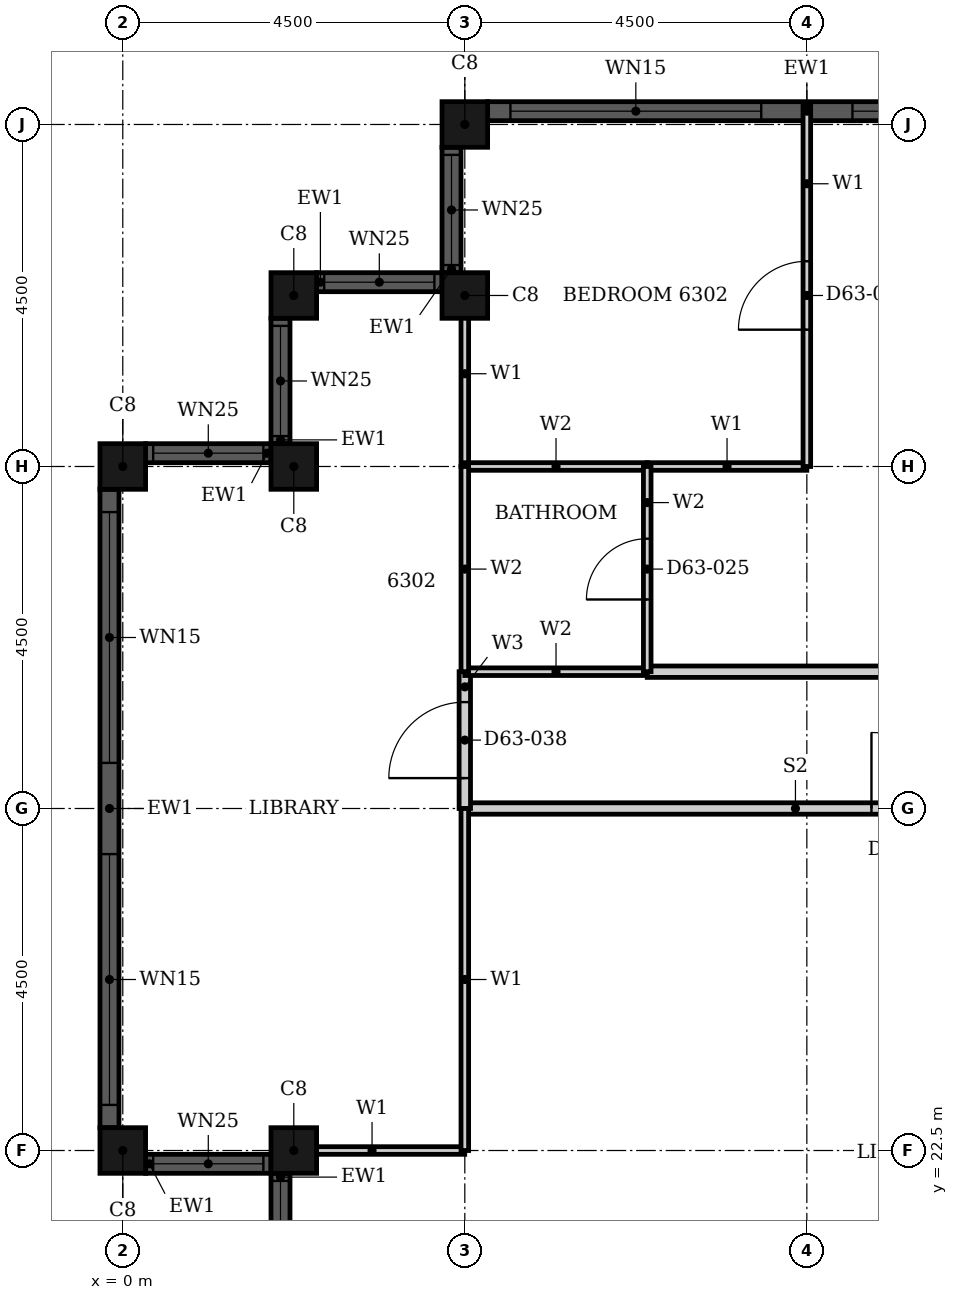
"""IFC4 building model, lengths in metres.
Left out: names, types, materials, properties, quantities, classifications, styles, units other than length and angle.
Written with IfcOpenShell. Run it as: python <this file> out.ifc"""

import sys

from ifc_helpers import new_model, si_unit, direction, frame, frame_2d, origin, origin_2d, place, context, subcontext, project, spatial, rectangle, hollow_rectangle, extrude, element, fill, save


model = new_model("IFC4")
c1 = context("Model", 3, precision=1e-05, world=origin(), true_north=direction((0.0, 1.0)))
c2 = subcontext(c1, "Body", "Model", "MODEL_VIEW")
j1 = project(units=[si_unit("LENGTHUNIT", "METRE"), si_unit("PLANEANGLEUNIT", "RADIAN")], contexts=[c1])
p1 = place(None, origin())
s1 = spatial("IfcSite", under=j1, at=p1, CompositionType="ELEMENT")
p2 = place(p1, origin())
s2 = spatial("IfcBuilding", under=s1, at=p2, CompositionType="ELEMENT")
p3 = place(p2, frame((0.0, 0.0, 249.0)))
s3 = spatial("IfcBuildingStorey", under=s2, at=p3, CompositionType="ELEMENT", Elevation=249.0)
for number, where, z_axis, x_axis in (
    (1, (4.5, 36.0, 0.0), (0.0, 0.0, 1.0), (1.0, 0.0, 0.0)),
    (2, (4.5, 33.75, 0.0), (0.0, 0.0, 1.0), (1.0, 0.0, 0.0)),
    (3, (2.25, 33.75, 0.0), (0.0, 0.0, 1.0), (1.0, 0.0, 0.0)),
    (4, (2.25, 31.5, 0.0), (0.0, 0.0, 1.0), (1.0, 0.0, 0.0)),
    (5, (0.0, 31.5, 0.0), (0.0, 0.0, 1.0), (1.0, 0.0, 0.0)),
    (6, (0.0, 22.5, 0.0), (0.0, 0.0, 1.0), (1.0, 0.0, 0.0)),
    (7, (2.25, 22.5, 0.0), (0.0, 0.0, 1.0), (1.0, 0.0, 0.0)),
):
    element("IfcColumn", number, at=place(p3, frame(where, z_axis=z_axis, x_axis=x_axis)), inside=s3, PredefinedType="COLUMN", context=c2, shape_type="SweptSolid", body=[
        extrude(hollow_rectangle(XDim=0.6, YDim=0.6, WallThickness=0.02, at=origin_2d()), origin(), (0.0, 0.0, 1.0), 3.7),
    ])
p4 = place(p3, frame((13.2, 36.175, 0.0), z_axis=(0.0, 0.0, 1.0), x_axis=(-1.0, 0.0, 0.0)))
e8 = element("IfcWall", 8, at=p4, inside=s3, PredefinedType="SOLIDWALL", context=c2, shape_type="SweptSolid", body=[
    extrude(rectangle(XDim=8.4, YDim=0.25, at=frame_2d((4.2, 0.0))), origin(), (0.0, 0.0, 1.0), 3.7),
])
p5 = place(p4, frame((0.3, 0.0, 0.45)))
e9 = element("IfcOpeningElement", 9, at=p5, cuts=e8, PredefinedType="OPENING", context=c2, shape_type="SweptSolid", body=[
    extrude(rectangle(XDim=3.3, YDim=2.3, at=frame_2d((1.65, 1.15))), frame((0.0, 0.135, 0.0), z_axis=(0.0, -1.0, 0.0), x_axis=(1.0, 0.0, 0.0)), (0.0, 0.0, 1.0), 0.27),
])
p6 = place(p4, frame((4.8, 0.0, 0.45)))
e10 = element("IfcOpeningElement", 10, at=p6, cuts=e8, PredefinedType="OPENING", context=c2, shape_type="SweptSolid", body=[
    extrude(rectangle(XDim=3.3, YDim=2.3, at=frame_2d((1.65, 1.15))), frame((0.0, 0.135, 0.0), z_axis=(0.0, -1.0, 0.0), x_axis=(1.0, 0.0, 0.0)), (0.0, 0.0, 1.0), 0.27),
])
p7 = place(p3, frame((4.325, 35.7, 0.0), z_axis=(0.0, 0.0, 1.0), x_axis=(0.0, -1.0, 0.0)))
e11 = element("IfcWall", 11, at=p7, inside=s3, PredefinedType="SOLIDWALL", context=c2, shape_type="SweptSolid", body=[
    extrude(rectangle(XDim=1.65, YDim=0.25, at=frame_2d((0.825, 0.0))), origin(), (0.0, 0.0, 1.0), 3.7),
])
p8 = place(p7, frame((0.1, 0.0, 0.9)))
e12 = element("IfcOpeningElement", 12, at=p8, cuts=e11, PredefinedType="OPENING", context=c2, shape_type="SweptSolid", body=[
    extrude(rectangle(XDim=1.45, YDim=1.85, at=frame_2d((0.725, 0.925))), frame((0.0, 0.135, 0.0), z_axis=(0.0, -1.0, 0.0), x_axis=(1.0, 0.0, 0.0)), (0.0, 0.0, 1.0), 0.27),
])
p9 = place(p3, frame((4.2, 33.925, 0.0), z_axis=(0.0, 0.0, 1.0), x_axis=(-1.0, 0.0, 0.0)))
e13 = element("IfcWall", 13, at=p9, inside=s3, PredefinedType="SOLIDWALL", context=c2, shape_type="SweptSolid", body=[
    extrude(rectangle(XDim=1.65, YDim=0.25, at=frame_2d((0.825, 0.0))), origin(), (0.0, 0.0, 1.0), 3.7),
])
p10 = place(p9, frame((0.1, 0.0, 0.9)))
e14 = element("IfcOpeningElement", 14, at=p10, cuts=e13, PredefinedType="OPENING", context=c2, shape_type="SweptSolid", body=[
    extrude(rectangle(XDim=1.45, YDim=1.85, at=frame_2d((0.725, 0.925))), frame((0.0, 0.135, 0.0), z_axis=(0.0, -1.0, 0.0), x_axis=(1.0, 0.0, 0.0)), (0.0, 0.0, 1.0), 0.27),
])
p11 = place(p3, frame((2.075, 33.45, 0.0), z_axis=(0.0, 0.0, 1.0), x_axis=(0.0, -1.0, 0.0)))
e15 = element("IfcWall", 15, at=p11, inside=s3, PredefinedType="SOLIDWALL", context=c2, shape_type="SweptSolid", body=[
    extrude(rectangle(XDim=1.65, YDim=0.25, at=frame_2d((0.825, 0.0))), origin(), (0.0, 0.0, 1.0), 3.7),
])
p12 = place(p11, frame((0.1, 0.0, 0.9)))
e16 = element("IfcOpeningElement", 16, at=p12, cuts=e15, PredefinedType="OPENING", context=c2, shape_type="SweptSolid", body=[
    extrude(rectangle(XDim=1.45, YDim=1.85, at=frame_2d((0.725, 0.925))), frame((0.0, 0.135, 0.0), z_axis=(0.0, -1.0, 0.0), x_axis=(1.0, 0.0, 0.0)), (0.0, 0.0, 1.0), 0.27),
])
p13 = place(p3, frame((1.95, 31.675, 0.0), z_axis=(0.0, 0.0, 1.0), x_axis=(-1.0, 0.0, 0.0)))
e17 = element("IfcWall", 17, at=p13, inside=s3, PredefinedType="SOLIDWALL", context=c2, shape_type="SweptSolid", body=[
    extrude(rectangle(XDim=1.65, YDim=0.25, at=frame_2d((0.825, 0.0))), origin(), (0.0, 0.0, 1.0), 3.7),
])
p14 = place(p13, frame((0.1, 0.0, 0.9)))
e18 = element("IfcOpeningElement", 18, at=p14, cuts=e17, PredefinedType="OPENING", context=c2, shape_type="SweptSolid", body=[
    extrude(rectangle(XDim=1.45, YDim=1.85, at=frame_2d((0.725, 0.925))), frame((0.0, 0.135, 0.0), z_axis=(0.0, -1.0, 0.0), x_axis=(1.0, 0.0, 0.0)), (0.0, 0.0, 1.0), 0.27),
])
p15 = place(p3, frame((-0.175, 31.2, 0.0), z_axis=(0.0, 0.0, 1.0), x_axis=(0.0, -1.0, 0.0)))
e19 = element("IfcWall", 19, at=p15, inside=s3, PredefinedType="SOLIDWALL", context=c2, shape_type="SweptSolid", body=[
    extrude(rectangle(XDim=8.4, YDim=0.25, at=frame_2d((4.2, 0.0))), origin(), (0.0, 0.0, 1.0), 3.7),
])
p16 = place(p15, frame((0.3, 0.0, 0.45)))
e20 = element("IfcOpeningElement", 20, at=p16, cuts=e19, PredefinedType="OPENING", context=c2, shape_type="SweptSolid", body=[
    extrude(rectangle(XDim=3.3, YDim=2.3, at=frame_2d((1.65, 1.15))), frame((0.0, 0.135, 0.0), z_axis=(0.0, -1.0, 0.0), x_axis=(1.0, 0.0, 0.0)), (0.0, 0.0, 1.0), 0.27),
])
p17 = place(p15, frame((4.8, 0.0, 0.45)))
e21 = element("IfcOpeningElement", 21, at=p17, cuts=e19, PredefinedType="OPENING", context=c2, shape_type="SweptSolid", body=[
    extrude(rectangle(XDim=3.3, YDim=2.3, at=frame_2d((1.65, 1.15))), frame((0.0, 0.135, 0.0), z_axis=(0.0, -1.0, 0.0), x_axis=(1.0, 0.0, 0.0)), (0.0, 0.0, 1.0), 0.27),
])
p18 = place(p3, frame((0.3, 22.325, 0.0), z_axis=(0.0, 0.0, 1.0), x_axis=(1.0, 0.0, 0.0)))
e22 = element("IfcWall", 22, at=p18, inside=s3, PredefinedType="SOLIDWALL", context=c2, shape_type="SweptSolid", body=[
    extrude(rectangle(XDim=1.65, YDim=0.25, at=frame_2d((0.825, 0.0))), origin(), (0.0, 0.0, 1.0), 3.7),
])
p19 = place(p18, frame((0.1, 0.0, 0.9)))
e23 = element("IfcOpeningElement", 23, at=p19, cuts=e22, PredefinedType="OPENING", context=c2, shape_type="SweptSolid", body=[
    extrude(rectangle(XDim=1.45, YDim=1.85, at=frame_2d((0.725, 0.925))), frame((0.0, 0.135, 0.0), z_axis=(0.0, -1.0, 0.0), x_axis=(1.0, 0.0, 0.0)), (0.0, 0.0, 1.0), 0.27),
])
p20 = place(p3, frame((2.075, 22.2, 0.0), z_axis=(0.0, 0.0, 1.0), x_axis=(0.0, -1.0, 0.0)))
e24 = element("IfcWall", 24, at=p20, inside=s3, PredefinedType="SOLIDWALL", context=c2, shape_type="SweptSolid", body=[
    extrude(rectangle(XDim=1.65, YDim=0.25, at=frame_2d((0.825, 0.0))), origin(), (0.0, 0.0, 1.0), 3.7),
])
p21 = place(p20, frame((0.1, 0.0, 0.9)))
e25 = element("IfcOpeningElement", 25, at=p21, cuts=e24, PredefinedType="OPENING", context=c2, shape_type="SweptSolid", body=[
    extrude(rectangle(XDim=1.45, YDim=1.85, at=frame_2d((0.725, 0.925))), frame((0.0, 0.135, 0.0), z_axis=(0.0, -1.0, 0.0), x_axis=(1.0, 0.0, 0.0)), (0.0, 0.0, 1.0), 0.27),
])
p22 = place(p3, frame((4.5, 27.0, 0.0), z_axis=(0.0, 0.0, 1.0), x_axis=(1.0, 0.0, 0.0)))
e26 = element("IfcWall", 26, at=p22, inside=s3, PredefinedType="PARTITIONING", context=c2, shape_type="SweptSolid", body=[
    extrude(rectangle(XDim=13.5, YDim=0.15, at=frame_2d((6.75, 0.0))), origin(), (0.0, 0.0, 1.0), 2.68),
])
p23 = place(p22, frame((5.35, 0.0, 0.0)))
e27 = element("IfcOpeningElement", 27, at=p23, cuts=e26, PredefinedType="OPENING", context=c2, shape_type="SweptSolid", body=[
    extrude(rectangle(XDim=1.0, YDim=2.1, at=frame_2d((0.5, 1.05))), frame((0.0, 0.085, 0.0), z_axis=(0.0, -1.0, 0.0), x_axis=(1.0, 0.0, 0.0)), (0.0, 0.0, 1.0), 0.17),
])
p24 = place(p3, frame((6.9, 28.8, 0.0), z_axis=(0.0, 0.0, 1.0), x_axis=(1.0, 0.0, 0.0)))
e28 = element("IfcWall", 28, at=p24, inside=s3, PredefinedType="PARTITIONING", context=c2, shape_type="SweptSolid", body=[
    extrude(rectangle(XDim=9.299, YDim=0.15, at=frame_2d((4.649, 0.0))), origin(), (0.0, 0.0, 1.0), 3.4),
])
p25 = place(p3, frame((4.5, 27.0, 0.0), z_axis=(0.0, 0.0, 1.0), x_axis=(0.0, 1.0, 0.0)))
e29 = element("IfcWall", 29, at=p25, inside=s3, PredefinedType="PARTITIONING", context=c2, shape_type="SweptSolid", body=[
    extrude(rectangle(XDim=1.8, YDim=0.15, at=frame_2d((0.9, 0.0))), origin(), (0.0, 0.0, 1.0), 3.4),
])
p26 = place(p25, frame((0.4, 0.0, 0.0)))
e30 = element("IfcOpeningElement", 30, at=p26, cuts=e29, PredefinedType="OPENING", context=c2, shape_type="SweptSolid", body=[
    extrude(rectangle(XDim=1.0, YDim=2.1, at=frame_2d((0.5, 1.05))), frame((0.0, 0.085, 0.0), z_axis=(0.0, -1.0, 0.0), x_axis=(1.0, 0.0, 0.0)), (0.0, 0.0, 1.0), 0.17),
])
p27 = place(p3, frame((2.06, 22.5, 0.0), z_axis=(0.0, 0.0, 1.0), x_axis=(1.0, 0.0, 0.0)))
e31 = element("IfcWall", 31, at=p27, inside=s3, PredefinedType="PARTITIONING", context=c2, shape_type="SweptSolid", body=[
    extrude(rectangle(XDim=2.439, YDim=0.1, at=frame_2d((1.219, 0.0))), origin(), (0.0, 0.0, 1.0), 2.68),
])
p28 = place(p3, frame((6.9, 31.5, 0.0), z_axis=(0.0, 0.0, 1.0), x_axis=(1.0, 0.0, 0.0)))
e32 = element("IfcWall", 32, at=p28, inside=s3, PredefinedType="PARTITIONING", context=c2, shape_type="SweptSolid", body=[
    extrude(rectangle(XDim=2.1, YDim=0.1, at=frame_2d((1.05, 0.0))), origin(), (0.0, 0.0, 1.0), 2.68),
])
p29 = place(p3, frame((4.5, 31.501, 0.0), z_axis=(0.0, 0.0, 1.0), x_axis=(0.0, 1.0, 0.0)))
e33 = element("IfcWall", 33, at=p29, inside=s3, PredefinedType="PARTITIONING", context=c2, shape_type="SweptSolid", body=[
    extrude(rectangle(XDim=2.439, YDim=0.1, at=frame_2d((1.219, 0.0))), origin(), (0.0, 0.0, 1.0), 3.4),
])
p30 = place(p3, frame((4.5, 22.5, 0.0), z_axis=(0.0, 0.0, 1.0), x_axis=(0.0, 1.0, 0.0)))
e34 = element("IfcWall", 34, at=p30, inside=s3, PredefinedType="PARTITIONING", context=c2, shape_type="SweptSolid", body=[
    extrude(rectangle(XDim=4.5, YDim=0.1, at=frame_2d((2.25, 0.0))), origin(), (0.0, 0.0, 1.0), 3.4),
])
p31 = place(p3, frame((9.0, 31.5, 0.0), z_axis=(0.0, 0.0, 1.0), x_axis=(0.0, 1.0, 0.0)))
e35 = element("IfcWall", 35, at=p31, inside=s3, PredefinedType="PARTITIONING", context=c2, shape_type="SweptSolid", body=[
    extrude(rectangle(XDim=4.74, YDim=0.1, at=frame_2d((2.37, 0.0))), origin(), (0.0, 0.0, 1.0), 3.4),
])
p32 = place(p31, frame((1.8, 0.0, 0.0)))
e36 = element("IfcOpeningElement", 36, at=p32, cuts=e35, PredefinedType="OPENING", context=c2, shape_type="SweptSolid", body=[
    extrude(rectangle(XDim=0.9, YDim=2.1, at=frame_2d((0.45, 1.05))), frame((0.0, 0.06, 0.0), z_axis=(0.0, -1.0, 0.0), x_axis=(1.0, 0.0, 0.0)), (0.0, 0.0, 1.0), 0.12),
])
p33 = place(p3, frame((4.5, 28.8, 0.0), z_axis=(0.0, 0.0, 1.0), x_axis=(1.0, 0.0, 0.0)))
e37 = element("IfcWall", 37, at=p33, inside=s3, PredefinedType="PARTITIONING", context=c2, shape_type="SweptSolid", body=[
    extrude(rectangle(XDim=2.4, YDim=0.1, at=frame_2d((1.2, 0.0))), origin(), (0.0, 0.0, 1.0), 3.4),
])
p34 = place(p3, frame((4.5, 31.5, 0.0), z_axis=(0.0, 0.0, 1.0), x_axis=(1.0, 0.0, 0.0)))
e38 = element("IfcWall", 38, at=p34, inside=s3, PredefinedType="PARTITIONING", context=c2, shape_type="SweptSolid", body=[
    extrude(rectangle(XDim=2.4, YDim=0.1, at=frame_2d((1.2, 0.0))), origin(), (0.0, 0.0, 1.0), 2.68),
])
p35 = place(p3, frame((4.5, 28.8, 0.0), z_axis=(0.0, 0.0, 1.0), x_axis=(0.0, 1.0, 0.0)))
e39 = element("IfcWall", 39, at=p35, inside=s3, PredefinedType="PARTITIONING", context=c2, shape_type="SweptSolid", body=[
    extrude(rectangle(XDim=2.7, YDim=0.1, at=frame_2d((1.35, 0.0))), origin(), (0.0, 0.0, 1.0), 3.4),
])
p36 = place(p3, frame((6.9, 28.8, 0.0), z_axis=(0.0, 0.0, 1.0), x_axis=(0.0, 1.0, 0.0)))
e40 = element("IfcWall", 40, at=p36, inside=s3, PredefinedType="PARTITIONING", context=c2, shape_type="SweptSolid", body=[
    extrude(rectangle(XDim=2.7, YDim=0.1, at=frame_2d((1.35, 0.0))), origin(), (0.0, 0.0, 1.0), 3.4),
])
p37 = place(p36, frame((0.95, 0.0, 0.0)))
e41 = element("IfcOpeningElement", 41, at=p37, cuts=e40, PredefinedType="OPENING", context=c2, shape_type="SweptSolid", body=[
    extrude(rectangle(XDim=0.8, YDim=2.1, at=frame_2d((0.4, 1.05))), frame((0.0, 0.06, 0.0), z_axis=(0.0, -1.0, 0.0), x_axis=(1.0, 0.0, 0.0)), (0.0, 0.0, 1.0), 0.12),
])
p38 = place(p5, origin())
e42 = element("IfcWindow", 42, at=p38, inside=s3, PartitioningType="SINGLE_PANEL", PredefinedType="WINDOW", context=c2, shape_type="SweptSolid", body=[
    extrude(rectangle(XDim=3.3, YDim=2.3, at=frame_2d((1.65, 1.15))), frame((0.0, 0.03, 0.0), z_axis=(0.0, -1.0, 0.0), x_axis=(1.0, 0.0, 0.0)), (0.0, 0.0, 1.0), 0.06),
])
fill(e9, e42)
p39 = place(p6, origin())
e43 = element("IfcWindow", 43, at=p39, inside=s3, PartitioningType="SINGLE_PANEL", PredefinedType="WINDOW", context=c2, shape_type="SweptSolid", body=[
    extrude(rectangle(XDim=3.3, YDim=2.3, at=frame_2d((1.65, 1.15))), frame((0.0, 0.03, 0.0), z_axis=(0.0, -1.0, 0.0), x_axis=(1.0, 0.0, 0.0)), (0.0, 0.0, 1.0), 0.06),
])
fill(e10, e43)
p40 = place(p8, origin())
e44 = element("IfcWindow", 44, at=p40, inside=s3, PartitioningType="SINGLE_PANEL", PredefinedType="WINDOW", context=c2, shape_type="SweptSolid", body=[
    extrude(rectangle(XDim=1.45, YDim=1.85, at=frame_2d((0.725, 0.925))), frame((0.0, 0.03, 0.0), z_axis=(0.0, -1.0, 0.0), x_axis=(1.0, 0.0, 0.0)), (0.0, 0.0, 1.0), 0.06),
])
fill(e12, e44)
p41 = place(p10, origin())
e45 = element("IfcWindow", 45, at=p41, inside=s3, PartitioningType="SINGLE_PANEL", PredefinedType="WINDOW", context=c2, shape_type="SweptSolid", body=[
    extrude(rectangle(XDim=1.45, YDim=1.85, at=frame_2d((0.725, 0.925))), frame((0.0, 0.03, 0.0), z_axis=(0.0, -1.0, 0.0), x_axis=(1.0, 0.0, 0.0)), (0.0, 0.0, 1.0), 0.06),
])
fill(e14, e45)
p42 = place(p12, origin())
e46 = element("IfcWindow", 46, at=p42, inside=s3, PartitioningType="SINGLE_PANEL", PredefinedType="WINDOW", context=c2, shape_type="SweptSolid", body=[
    extrude(rectangle(XDim=1.45, YDim=1.85, at=frame_2d((0.725, 0.925))), frame((0.0, 0.03, 0.0), z_axis=(0.0, -1.0, 0.0), x_axis=(1.0, 0.0, 0.0)), (0.0, 0.0, 1.0), 0.06),
])
fill(e16, e46)
p43 = place(p14, origin())
e47 = element("IfcWindow", 47, at=p43, inside=s3, PartitioningType="SINGLE_PANEL", PredefinedType="WINDOW", context=c2, shape_type="SweptSolid", body=[
    extrude(rectangle(XDim=1.45, YDim=1.85, at=frame_2d((0.725, 0.925))), frame((0.0, 0.03, 0.0), z_axis=(0.0, -1.0, 0.0), x_axis=(1.0, 0.0, 0.0)), (0.0, 0.0, 1.0), 0.06),
])
fill(e18, e47)
p44 = place(p16, origin())
e48 = element("IfcWindow", 48, at=p44, inside=s3, PartitioningType="SINGLE_PANEL", PredefinedType="WINDOW", context=c2, shape_type="SweptSolid", body=[
    extrude(rectangle(XDim=3.3, YDim=2.3, at=frame_2d((1.65, 1.15))), frame((0.0, 0.03, 0.0), z_axis=(0.0, -1.0, 0.0), x_axis=(1.0, 0.0, 0.0)), (0.0, 0.0, 1.0), 0.06),
])
fill(e20, e48)
p45 = place(p17, origin())
e49 = element("IfcWindow", 49, at=p45, inside=s3, PartitioningType="SINGLE_PANEL", PredefinedType="WINDOW", context=c2, shape_type="SweptSolid", body=[
    extrude(rectangle(XDim=3.3, YDim=2.3, at=frame_2d((1.65, 1.15))), frame((0.0, 0.03, 0.0), z_axis=(0.0, -1.0, 0.0), x_axis=(1.0, 0.0, 0.0)), (0.0, 0.0, 1.0), 0.06),
])
fill(e21, e49)
p46 = place(p19, origin())
e50 = element("IfcWindow", 50, at=p46, inside=s3, PartitioningType="SINGLE_PANEL", PredefinedType="WINDOW", context=c2, shape_type="SweptSolid", body=[
    extrude(rectangle(XDim=1.45, YDim=1.85, at=frame_2d((0.725, 0.925))), frame((0.0, 0.03, 0.0), z_axis=(0.0, -1.0, 0.0), x_axis=(1.0, 0.0, 0.0)), (0.0, 0.0, 1.0), 0.06),
])
fill(e23, e50)
p47 = place(p21, origin())
e51 = element("IfcWindow", 51, at=p47, inside=s3, PartitioningType="SINGLE_PANEL", PredefinedType="WINDOW", context=c2, shape_type="SweptSolid", body=[
    extrude(rectangle(XDim=1.45, YDim=1.85, at=frame_2d((0.725, 0.925))), frame((0.0, 0.03, 0.0), z_axis=(0.0, -1.0, 0.0), x_axis=(1.0, 0.0, 0.0)), (0.0, 0.0, 1.0), 0.06),
])
fill(e25, e51)
p48 = place(p37, origin())
e52 = element("IfcDoor", 52, at=p48, inside=s3, OperationType="SINGLE_SWING_LEFT", PredefinedType="DOOR", context=c2, shape_type="SweptSolid", body=[
    extrude(rectangle(XDim=0.8, YDim=2.1, at=frame_2d((0.4, 1.05))), frame((0.0, 0.025, 0.0), z_axis=(0.0, -1.0, 0.0), x_axis=(1.0, 0.0, 0.0)), (0.0, 0.0, 1.0), 0.05),
])
fill(e41, e52)
p49 = place(p32, origin())
e53 = element("IfcDoor", 53, at=p49, inside=s3, OperationType="SINGLE_SWING_LEFT", PredefinedType="DOOR", context=c2, shape_type="SweptSolid", body=[
    extrude(rectangle(XDim=0.9, YDim=2.1, at=frame_2d((0.45, 1.05))), frame((0.0, 0.025, 0.0), z_axis=(0.0, -1.0, 0.0), x_axis=(1.0, 0.0, 0.0)), (0.0, 0.0, 1.0), 0.05),
])
fill(e36, e53)
p50 = place(p23, origin())
e54 = element("IfcDoor", 54, at=p50, inside=s3, OperationType="SINGLE_SWING_LEFT", PredefinedType="DOOR", context=c2, shape_type="SweptSolid", body=[
    extrude(rectangle(XDim=1.0, YDim=2.1, at=frame_2d((0.5, 1.05))), frame((0.0, 0.025, 0.0), z_axis=(0.0, -1.0, 0.0), x_axis=(1.0, 0.0, 0.0)), (0.0, 0.0, 1.0), 0.05),
])
fill(e27, e54)
p51 = place(p26, origin())
e55 = element("IfcDoor", 55, at=p51, inside=s3, OperationType="SINGLE_SWING_LEFT", PredefinedType="DOOR", context=c2, shape_type="SweptSolid", body=[
    extrude(rectangle(XDim=1.0, YDim=2.1, at=frame_2d((0.5, 1.05))), frame((0.0, 0.025, 0.0), z_axis=(0.0, -1.0, 0.0), x_axis=(1.0, 0.0, 0.0)), (0.0, 0.0, 1.0), 0.05),
])
fill(e30, e55)
save(model, sys.argv[1])
